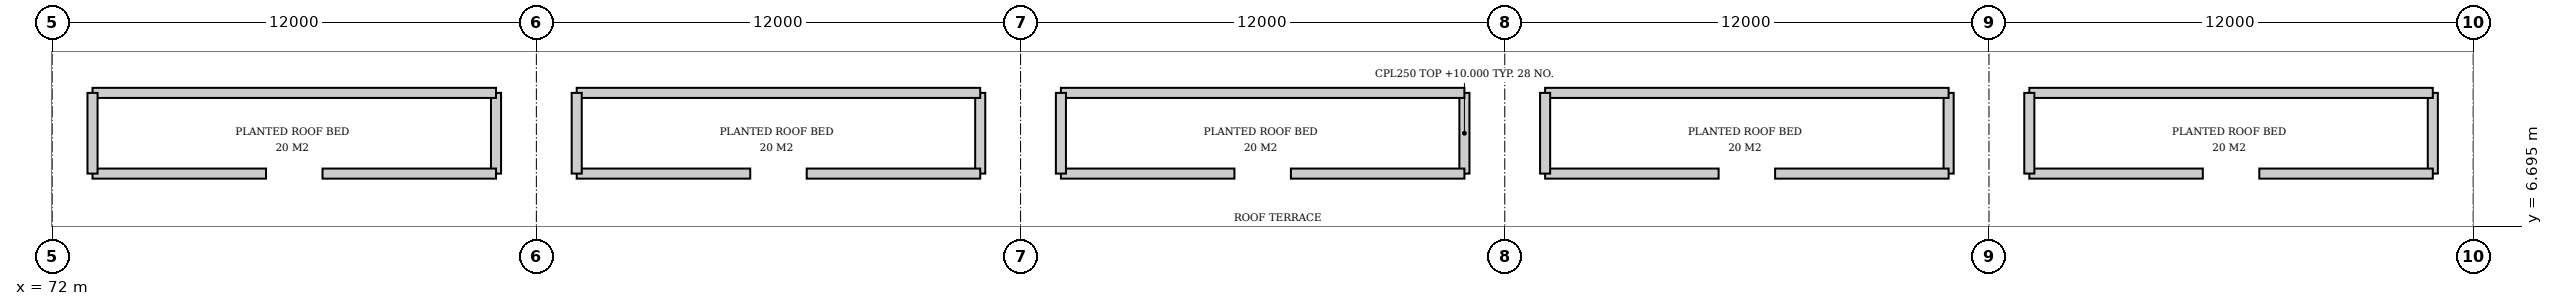
"""IFC4 building model, lengths in metres.
Left out: names, types, materials, properties, quantities, classifications, styles, units other than length and angle.
Written with IfcOpenShell. Run it as: python <this file> out.ifc"""

import sys

from ifc_helpers import new_model, si_unit, direction, frame, frame_2d, origin, place, context, subcontext, project, spatial, rectangle, extrude, element, save


model = new_model("IFC4")
c1 = context("Model", 3, precision=1e-05, world=origin(), true_north=direction((0.0, 1.0)))
c2 = subcontext(c1, "Body", "Model", "MODEL_VIEW")
j1 = project(units=[si_unit("LENGTHUNIT", "METRE"), si_unit("PLANEANGLEUNIT", "RADIAN")], contexts=[c1])
p1 = place(None, origin())
s1 = spatial("IfcSite", under=j1, at=p1, CompositionType="ELEMENT")
p2 = place(p1, origin())
s2 = spatial("IfcBuilding", under=s1, at=p2, CompositionType="ELEMENT")
p3 = place(p2, frame((0.0, 0.0, 9.4)))
s3 = spatial("IfcBuildingStorey", under=s2, at=p3, CompositionType="ELEMENT", Elevation=9.4)
for number, where, z_axis, x_axis in (
    (1, (73.0, 8.0, 0.0), (0.0, 0.0, 1.0), (1.0, 0.0, 0.0)),
    (2, (78.7, 8.0, 0.0), (0.0, 0.0, 1.0), (1.0, 0.0, 0.0)),
):
    element("IfcWall", number, at=place(p3, frame(where, z_axis=z_axis, x_axis=x_axis)), inside=s3, PredefinedType="SOLIDWALL", context=c2, shape_type="SweptSolid", body=[
        extrude(rectangle(XDim=4.3, YDim=0.25, at=frame_2d((2.15, 0.0))), origin(), (0.0, 0.0, 1.0), 0.6),
    ])
p4 = place(p3, frame((73.0, 10.0, 0.0), z_axis=(0.0, 0.0, 1.0), x_axis=(1.0, 0.0, 0.0)))
e3 = element("IfcWall", 3, at=p4, inside=s3, PredefinedType="SOLIDWALL", context=c2, shape_type="SweptSolid", body=[
    extrude(rectangle(XDim=10.0, YDim=0.25, at=frame_2d((5.0, 0.0))), origin(), (0.0, 0.0, 1.0), 0.6),
])
for number, where, z_axis, x_axis in (
    (4, (73.0, 8.0, 0.0), (0.0, 0.0, 1.0), (0.0, 1.0, 0.0)),
    (5, (83.0, 8.0, 0.0), (0.0, 0.0, 1.0), (0.0, 1.0, 0.0)),
):
    element("IfcWall", number, at=place(p3, frame(where, z_axis=z_axis, x_axis=x_axis)), inside=s3, PredefinedType="SOLIDWALL", context=c2, shape_type="SweptSolid", body=[
        extrude(rectangle(XDim=2.0, YDim=0.25, at=frame_2d((1.0, 0.0))), origin(), (0.0, 0.0, 1.0), 0.6),
    ])
for number, where, z_axis, x_axis in (
    (6, (85.0, 8.0, 0.0), (0.0, 0.0, 1.0), (1.0, 0.0, 0.0)),
    (7, (90.7, 8.0, 0.0), (0.0, 0.0, 1.0), (1.0, 0.0, 0.0)),
):
    element("IfcWall", number, at=place(p3, frame(where, z_axis=z_axis, x_axis=x_axis)), inside=s3, PredefinedType="SOLIDWALL", context=c2, shape_type="SweptSolid", body=[
        extrude(rectangle(XDim=4.3, YDim=0.25, at=frame_2d((2.15, 0.0))), origin(), (0.0, 0.0, 1.0), 0.6),
    ])
p5 = place(p3, frame((85.0, 10.0, 0.0), z_axis=(0.0, 0.0, 1.0), x_axis=(1.0, 0.0, 0.0)))
e8 = element("IfcWall", 8, at=p5, inside=s3, PredefinedType="SOLIDWALL", context=c2, shape_type="SweptSolid", body=[
    extrude(rectangle(XDim=10.0, YDim=0.25, at=frame_2d((5.0, 0.0))), origin(), (0.0, 0.0, 1.0), 0.6),
])
for number, where, z_axis, x_axis in (
    (9, (85.0, 8.0, 0.0), (0.0, 0.0, 1.0), (0.0, 1.0, 0.0)),
    (10, (95.0, 8.0, 0.0), (0.0, 0.0, 1.0), (0.0, 1.0, 0.0)),
):
    element("IfcWall", number, at=place(p3, frame(where, z_axis=z_axis, x_axis=x_axis)), inside=s3, PredefinedType="SOLIDWALL", context=c2, shape_type="SweptSolid", body=[
        extrude(rectangle(XDim=2.0, YDim=0.25, at=frame_2d((1.0, 0.0))), origin(), (0.0, 0.0, 1.0), 0.6),
    ])
for number, where, z_axis, x_axis in (
    (11, (97.0, 8.0, 0.0), (0.0, 0.0, 1.0), (1.0, 0.0, 0.0)),
    (12, (102.7, 8.0, 0.0), (0.0, 0.0, 1.0), (1.0, 0.0, 0.0)),
):
    element("IfcWall", number, at=place(p3, frame(where, z_axis=z_axis, x_axis=x_axis)), inside=s3, PredefinedType="SOLIDWALL", context=c2, shape_type="SweptSolid", body=[
        extrude(rectangle(XDim=4.3, YDim=0.25, at=frame_2d((2.15, 0.0))), origin(), (0.0, 0.0, 1.0), 0.6),
    ])
p6 = place(p3, frame((97.0, 10.0, 0.0), z_axis=(0.0, 0.0, 1.0), x_axis=(1.0, 0.0, 0.0)))
e13 = element("IfcWall", 13, at=p6, inside=s3, PredefinedType="SOLIDWALL", context=c2, shape_type="SweptSolid", body=[
    extrude(rectangle(XDim=10.0, YDim=0.25, at=frame_2d((5.0, 0.0))), origin(), (0.0, 0.0, 1.0), 0.6),
])
for number, where, z_axis, x_axis in (
    (14, (97.0, 8.0, 0.0), (0.0, 0.0, 1.0), (0.0, 1.0, 0.0)),
    (15, (107.0, 8.0, 0.0), (0.0, 0.0, 1.0), (0.0, 1.0, 0.0)),
):
    element("IfcWall", number, at=place(p3, frame(where, z_axis=z_axis, x_axis=x_axis)), inside=s3, PredefinedType="SOLIDWALL", context=c2, shape_type="SweptSolid", body=[
        extrude(rectangle(XDim=2.0, YDim=0.25, at=frame_2d((1.0, 0.0))), origin(), (0.0, 0.0, 1.0), 0.6),
    ])
for number, where, z_axis, x_axis in (
    (16, (109.0, 8.0, 0.0), (0.0, 0.0, 1.0), (1.0, 0.0, 0.0)),
    (17, (114.7, 8.0, 0.0), (0.0, 0.0, 1.0), (1.0, 0.0, 0.0)),
):
    element("IfcWall", number, at=place(p3, frame(where, z_axis=z_axis, x_axis=x_axis)), inside=s3, PredefinedType="SOLIDWALL", context=c2, shape_type="SweptSolid", body=[
        extrude(rectangle(XDim=4.3, YDim=0.25, at=frame_2d((2.15, 0.0))), origin(), (0.0, 0.0, 1.0), 0.6),
    ])
p7 = place(p3, frame((109.0, 10.0, 0.0), z_axis=(0.0, 0.0, 1.0), x_axis=(1.0, 0.0, 0.0)))
e18 = element("IfcWall", 18, at=p7, inside=s3, PredefinedType="SOLIDWALL", context=c2, shape_type="SweptSolid", body=[
    extrude(rectangle(XDim=10.0, YDim=0.25, at=frame_2d((5.0, 0.0))), origin(), (0.0, 0.0, 1.0), 0.6),
])
for number, where, z_axis, x_axis in (
    (19, (109.0, 8.0, 0.0), (0.0, 0.0, 1.0), (0.0, 1.0, 0.0)),
    (20, (119.0, 8.0, 0.0), (0.0, 0.0, 1.0), (0.0, 1.0, 0.0)),
):
    element("IfcWall", number, at=place(p3, frame(where, z_axis=z_axis, x_axis=x_axis)), inside=s3, PredefinedType="SOLIDWALL", context=c2, shape_type="SweptSolid", body=[
        extrude(rectangle(XDim=2.0, YDim=0.25, at=frame_2d((1.0, 0.0))), origin(), (0.0, 0.0, 1.0), 0.6),
    ])
for number, where, z_axis, x_axis in (
    (21, (121.0, 8.0, 0.0), (0.0, 0.0, 1.0), (1.0, 0.0, 0.0)),
    (22, (126.7, 8.0, 0.0), (0.0, 0.0, 1.0), (1.0, 0.0, 0.0)),
):
    element("IfcWall", number, at=place(p3, frame(where, z_axis=z_axis, x_axis=x_axis)), inside=s3, PredefinedType="SOLIDWALL", context=c2, shape_type="SweptSolid", body=[
        extrude(rectangle(XDim=4.3, YDim=0.25, at=frame_2d((2.15, 0.0))), origin(), (0.0, 0.0, 1.0), 0.6),
    ])
p8 = place(p3, frame((121.0, 10.0, 0.0), z_axis=(0.0, 0.0, 1.0), x_axis=(1.0, 0.0, 0.0)))
e23 = element("IfcWall", 23, at=p8, inside=s3, PredefinedType="SOLIDWALL", context=c2, shape_type="SweptSolid", body=[
    extrude(rectangle(XDim=10.0, YDim=0.25, at=frame_2d((5.0, 0.0))), origin(), (0.0, 0.0, 1.0), 0.6),
])
for number, where, z_axis, x_axis in (
    (24, (121.0, 8.0, 0.0), (0.0, 0.0, 1.0), (0.0, 1.0, 0.0)),
    (25, (131.0, 8.0, 0.0), (0.0, 0.0, 1.0), (0.0, 1.0, 0.0)),
):
    element("IfcWall", number, at=place(p3, frame(where, z_axis=z_axis, x_axis=x_axis)), inside=s3, PredefinedType="SOLIDWALL", context=c2, shape_type="SweptSolid", body=[
        extrude(rectangle(XDim=2.0, YDim=0.25, at=frame_2d((1.0, 0.0))), origin(), (0.0, 0.0, 1.0), 0.6),
    ])
save(model, sys.argv[1])
